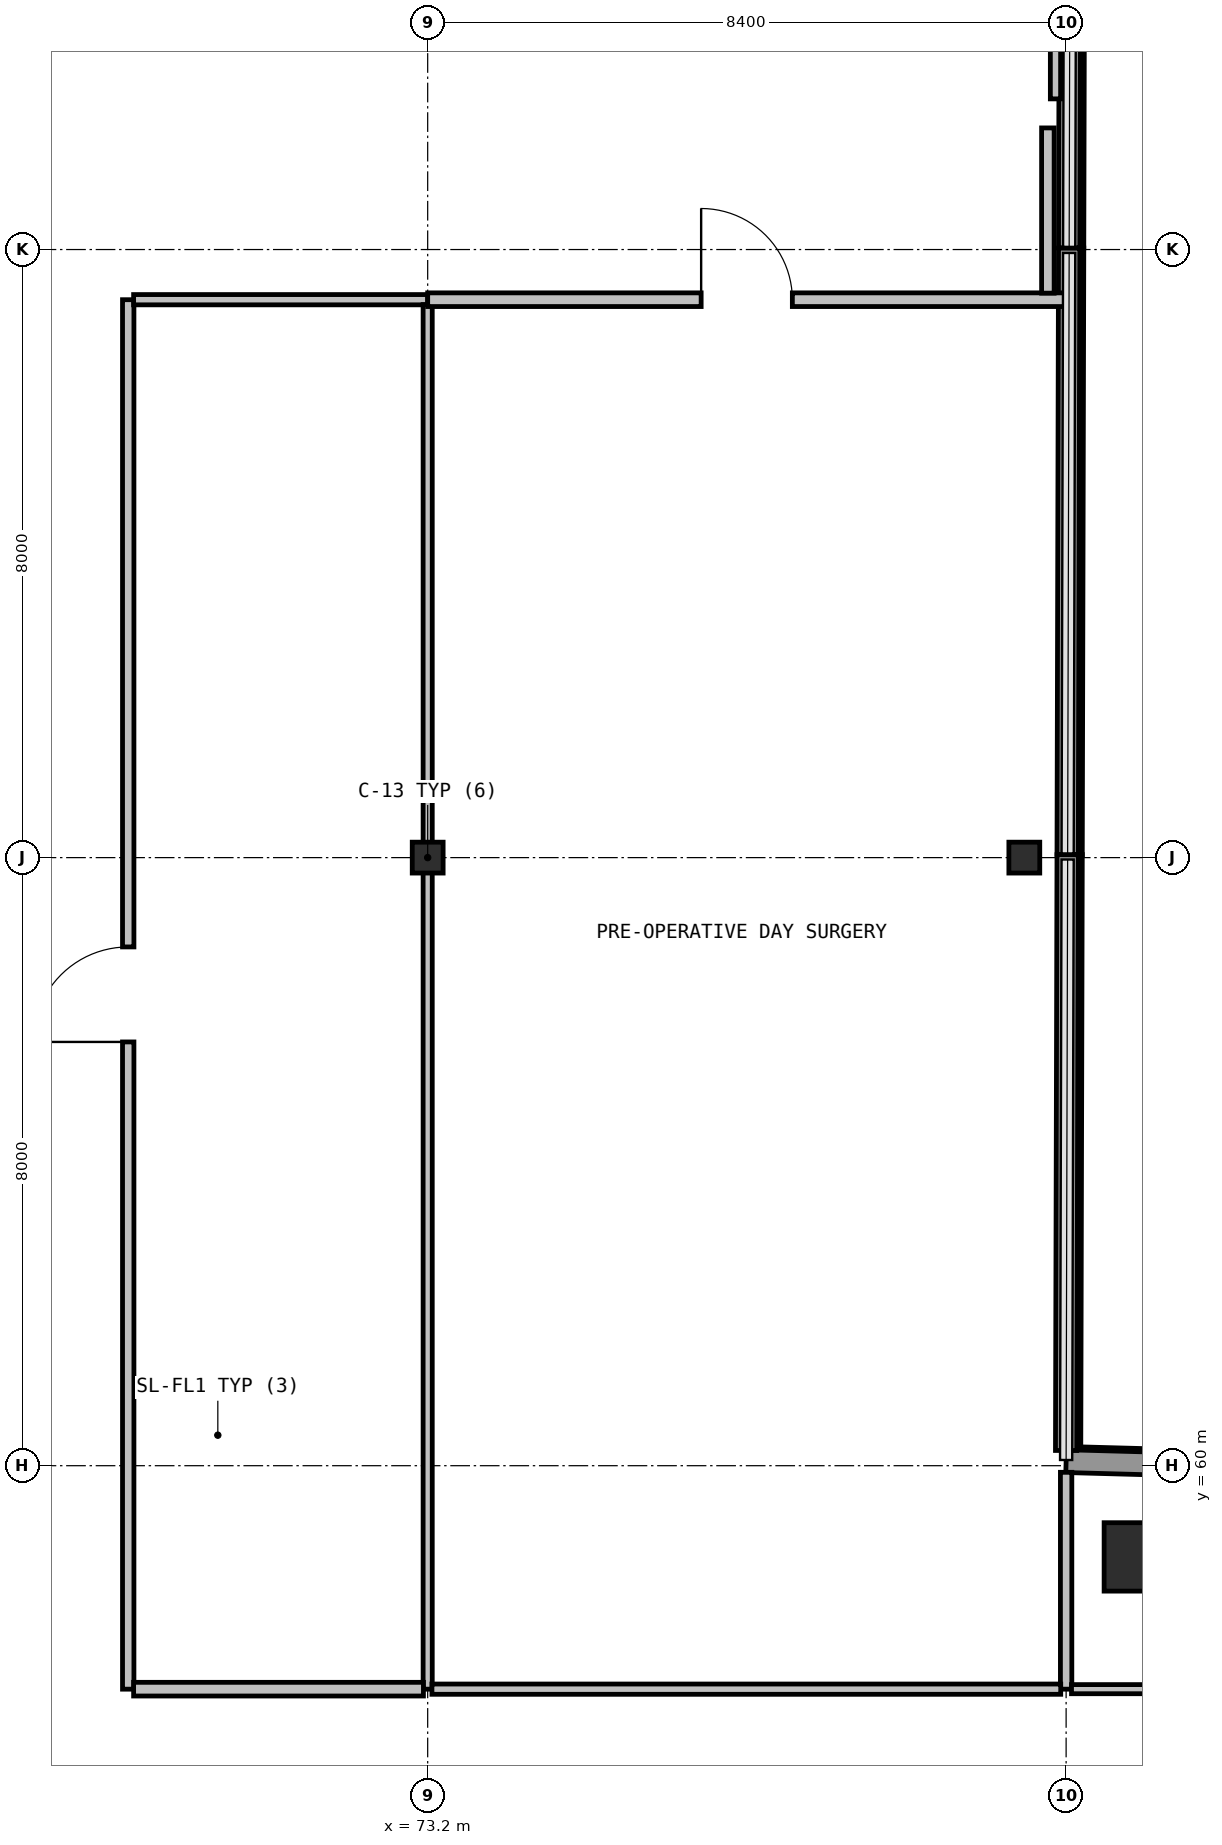
"""IFC4 building model, lengths in metres.
Left out: names, types, materials, properties, quantities, classifications, styles, units other than length and angle.
Written with IfcOpenShell. Run it as: python <this file> out.ifc"""

import sys

from ifc_helpers import new_model, si_unit, direction, frame, frame_2d, origin, origin_2d, place, context, subcontext, project, spatial, rectangle, hollow_circle, extrude, element, fill, save


model = new_model("IFC4")
c1 = context("Model", 3, precision=1e-05, world=origin(), true_north=direction((0.0, 1.0)))
c2 = subcontext(c1, "Body", "Model", "MODEL_VIEW")
j1 = project(units=[si_unit("LENGTHUNIT", "METRE"), si_unit("PLANEANGLEUNIT", "RADIAN")], contexts=[c1])
p1 = place(None, origin())
s1 = spatial("IfcSite", under=j1, at=p1, CompositionType="ELEMENT")
p2 = place(p1, origin())
s2 = spatial("IfcBuilding", under=s1, at=p2, CompositionType="ELEMENT")
p3 = place(p2, frame((0.0, 0.0, 5.4)))
s3 = spatial("IfcBuildingStorey", under=s2, at=p3, CompositionType="ELEMENT", Elevation=5.4)
for number, where, z_axis, x_axis in (
    (1, (73.2, 68.0, 0.0), (0.0, 0.0, 1.0), (1.0, 0.0, 0.0)),
    (2, (81.05, 68.0, 0.0), (0.0, 0.0, 1.0), (1.0, 0.0, 0.0)),
):
    element("IfcColumn", number, at=place(p3, frame(where, z_axis=z_axis, x_axis=x_axis)), inside=s3, PredefinedType="COLUMN", context=c2, shape_type="SweptSolid", body=[
        extrude(hollow_circle(Radius=0.203, WallThickness=0.016, at=origin_2d()), origin(), (0.0, 0.0, 1.0), 4.8),
    ])
p4 = place(p3, frame((82.55, 58.8, 0.0), z_axis=(0.0, 0.0, 1.0), x_axis=(1.0, 0.0, 0.0)))
e3 = element("IfcColumn", 3, at=p4, inside=s3, PredefinedType="COLUMN", context=c2, shape_type="SweptSolid", body=[
    extrude(rectangle(XDim=0.9, YDim=0.9, at=origin_2d()), origin(), (0.0, 0.0, 1.0), 4.8),
])
p5 = place(p3, frame((81.6, 60.06, 0.0), z_axis=(0.0, 0.0, 1.0), x_axis=(0.999631579517, -0.027142314411, 0.0)))
e4 = element("IfcWall", 4, at=p5, inside=s3, PredefinedType="SOLIDWALL", context=c2, shape_type="SweptSolid", body=[
    extrude(rectangle(XDim=2.213, YDim=0.3, at=frame_2d((1.106, 0.0))), origin(), (0.0, 0.0, 1.0), 4.445),
])
p6 = place(p3, frame((81.66, 83.86, 0.0), z_axis=(0.0, 0.0, 1.0), x_axis=(-0.002554110965, -0.999996738253, 0.0)))
e5 = element("IfcWall", 5, at=p6, inside=s3, PredefinedType="SOLIDWALL", context=c2, shape_type="SweptSolid", body=[
    extrude(rectangle(XDim=7.838, YDim=0.28, at=frame_2d((3.919, 0.0))), origin(), (0.0, 0.0, 1.0), 0.94),
])
p7 = place(p3, frame((81.64, 76.018, 0.0), z_axis=(0.0, 0.0, 1.0), x_axis=(-0.002479331223, -0.999996926454, 0.0)))
e6 = element("IfcWall", 6, at=p7, inside=s3, PredefinedType="SOLIDWALL", context=c2, shape_type="SweptSolid", body=[
    extrude(rectangle(XDim=7.976, YDim=0.28, at=frame_2d((3.988, 0.0))), origin(), (0.0, 0.0, 1.0), 0.94),
])
p8 = place(p3, frame((81.62, 68.038, 0.0), z_axis=(0.0, 0.0, 1.0), x_axis=(-0.002554110965, -0.999996738253, 0.0)))
e7 = element("IfcWall", 7, at=p8, inside=s3, PredefinedType="SOLIDWALL", context=c2, shape_type="SweptSolid", body=[
    extrude(rectangle(XDim=7.838, YDim=0.28, at=frame_2d((3.919, 0.0))), origin(), (0.0, 0.0, 1.0), 0.94),
])
p9 = place(p3, frame((69.26, 57.06, 0.0), z_axis=(0.0, 0.0, 1.0), x_axis=(0.0, 1.0, 0.0)))
e8 = element("IfcWall", 8, at=p9, inside=s3, PredefinedType="PARTITIONING", context=c2, shape_type="SweptSolid", body=[
    extrude(rectangle(XDim=18.28, YDim=0.15, at=frame_2d((9.14, 0.0))), origin(), (0.0, 0.0, 1.0), 4.445),
])
p10 = place(p9, frame((8.515, 0.0, 0.0)))
e9 = element("IfcOpeningElement", 9, at=p10, cuts=e8, PredefinedType="OPENING", context=c2, shape_type="SweptSolid", body=[
    extrude(rectangle(XDim=1.25, YDim=2.15, at=frame_2d((0.625, 1.075))), frame((0.0, 0.085, 0.0), z_axis=(0.0, -1.0, 0.0), x_axis=(1.0, 0.0, 0.0)), (0.0, 0.0, 1.0), 0.17),
])
p11 = place(p3, frame((69.331, 75.34, 0.0), z_axis=(0.0, 0.0, 1.0), x_axis=(1.0, 0.0, 0.0)))
e10 = element("IfcWall", 10, at=p11, inside=s3, PredefinedType="PARTITIONING", context=c2, shape_type="SweptSolid", body=[
    extrude(rectangle(XDim=3.869, YDim=0.135, at=frame_2d((1.935, 0.0))), origin(), (0.0, 0.0, 1.0), 4.445),
])
p12 = place(p3, frame((73.2, 75.276, 0.0), z_axis=(0.0, 0.0, 1.0), x_axis=(0.0, -1.0, 0.0)))
e11 = element("IfcWall", 11, at=p12, inside=s3, PredefinedType="PARTITIONING", context=c2, shape_type="SweptSolid", body=[
    extrude(rectangle(XDim=18.216, YDim=0.12, at=frame_2d((9.108, 0.0))), origin(), (0.0, 0.0, 1.0), 3.695),
])
p13 = place(p3, frame((73.144, 57.06, 0.0), z_axis=(0.0, 0.0, 1.0), x_axis=(-1.0, 0.0, 0.0)))
e12 = element("IfcWall", 12, at=p13, inside=s3, PredefinedType="PARTITIONING", context=c2, shape_type="SweptSolid", body=[
    extrude(rectangle(XDim=3.813, YDim=0.18, at=frame_2d((1.906, 0.0))), origin(), (0.0, 0.0, 1.0), 4.445),
])
p14 = place(p3, frame((73.2, 75.34, 0.0), z_axis=(0.0, 0.0, 1.0), x_axis=(1.0, 0.0, 0.0)))
e13 = element("IfcWall", 13, at=p14, inside=s3, PredefinedType="PARTITIONING", context=c2, shape_type="SweptSolid", body=[
    extrude(rectangle(XDim=8.396, YDim=0.18, at=frame_2d((4.198, 0.0))), origin(), (0.0, 0.0, 1.0), 4.445),
])
p15 = place(p14, frame((3.598, 0.0, 0.0)))
e14 = element("IfcOpeningElement", 14, at=p15, cuts=e13, PredefinedType="OPENING", context=c2, shape_type="SweptSolid", body=[
    extrude(rectangle(XDim=1.2, YDim=2.15, at=frame_2d((0.6, 1.075))), frame((0.0, 0.1, 0.0), z_axis=(0.0, -1.0, 0.0), x_axis=(1.0, 0.0, 0.0)), (0.0, 0.0, 1.0), 0.2),
])
p16 = place(p3, frame((81.36, 75.426, 0.0), z_axis=(0.0, 0.0, 1.0), x_axis=(0.0, 1.0, 0.0)))
e15 = element("IfcWall", 15, at=p16, inside=s3, PredefinedType="PARTITIONING", context=c2, shape_type="SweptSolid", body=[
    extrude(rectangle(XDim=2.174, YDim=0.165, at=frame_2d((1.087, 0.0))), origin(), (0.0, 0.0, 1.0), 3.695),
])
p17 = place(p3, frame((81.6, 59.913, 0.0), z_axis=(0.0, 0.0, 1.0), x_axis=(0.0, -1.0, 0.0)))
e16 = element("IfcWall", 16, at=p17, inside=s3, PredefinedType="PARTITIONING", context=c2, shape_type="SweptSolid", body=[
    extrude(rectangle(XDim=2.853, YDim=0.15, at=frame_2d((1.427, 0.0))), origin(), (0.0, 0.0, 1.0), 4.445),
])
p18 = place(p3, frame((81.529, 57.06, 0.0), z_axis=(0.0, 0.0, 1.0), x_axis=(-1.0, 0.0, 0.0)))
e17 = element("IfcWall", 17, at=p18, inside=s3, PredefinedType="PARTITIONING", context=c2, shape_type="SweptSolid", body=[
    extrude(rectangle(XDim=8.273, YDim=0.135, at=frame_2d((4.136, 0.0))), origin(), (0.0, 0.0, 1.0), 4.445),
])
p19 = place(p3, frame((84.876, 57.06, 0.0), z_axis=(0.0, 0.0, 1.0), x_axis=(-1.0, 0.0, 0.0)))
e18 = element("IfcWall", 18, at=p19, inside=s3, PredefinedType="PARTITIONING", context=c2, shape_type="SweptSolid", body=[
    extrude(rectangle(XDim=3.205, YDim=0.12, at=frame_2d((1.603, 0.0))), origin(), (0.0, 0.0, 1.0), 4.445),
])
p20 = place(p3, frame((81.46, 79.496, 0.0), z_axis=(0.0, 0.0, 1.0), x_axis=(0.0, -1.0, 0.0)))
e19 = element("IfcWall", 19, at=p20, inside=s3, PredefinedType="PARTITIONING", context=c2, shape_type="SweptSolid", body=[
    extrude(rectangle(XDim=1.514, YDim=0.135, at=frame_2d((0.757, 0.0))), origin(), (0.0, 0.0, 1.0), 4.445),
])
p21 = place(p10, origin())
e20 = element("IfcDoor", 20, at=p21, inside=s3, OperationType="SINGLE_SWING_RIGHT", PredefinedType="DOOR", context=c2, shape_type="SweptSolid", body=[
    extrude(rectangle(XDim=1.25, YDim=2.15, at=frame_2d((0.625, 1.075))), frame((0.0, 0.025, 0.0), z_axis=(0.0, -1.0, 0.0), x_axis=(1.0, 0.0, 0.0)), (0.0, 0.0, 1.0), 0.05),
])
fill(e9, e20)
p22 = place(p15, origin())
e21 = element("IfcDoor", 21, at=p22, inside=s3, OperationType="SINGLE_SWING_LEFT", PredefinedType="DOOR", context=c2, shape_type="SweptSolid", body=[
    extrude(rectangle(XDim=1.2, YDim=2.15, at=frame_2d((0.6, 1.075))), frame((0.0, 0.025, 0.0), z_axis=(0.0, -1.0, 0.0), x_axis=(1.0, 0.0, 0.0)), (0.0, 0.0, 1.0), 0.05),
])
fill(e14, e21)
save(model, sys.argv[1])
